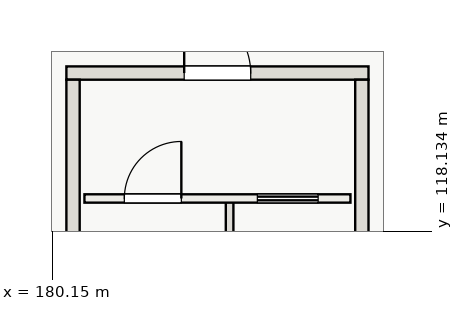
"""IFC4 building model, lengths in metres.
Left out: names, types, materials, properties, quantities, classifications, styles, units other than length and angle.
Written with IfcOpenShell. Run it as: python <this file> out.ifc"""

import sys

from ifc_helpers import new_model, si_unit, direction, frame, frame_2d, origin, place, context, subcontext, project, spatial, rectangle, extrude, element, fill, save


model = new_model("IFC4")
c1 = context("Model", 3, precision=1e-05, world=origin(), true_north=direction((0.0, 1.0)))
c2 = subcontext(c1, "Body", "Model", "MODEL_VIEW")
j1 = project(units=[si_unit("LENGTHUNIT", "METRE"), si_unit("PLANEANGLEUNIT", "RADIAN")], contexts=[c1])
p1 = place(None, origin())
s1 = spatial("IfcSite", under=j1, at=p1, CompositionType="ELEMENT")
p2 = place(p1, origin())
s2 = spatial("IfcBuilding", under=s1, at=p2, CompositionType="ELEMENT")
p3 = place(p2, origin())
s3 = spatial("IfcBuildingStorey", under=s2, at=p3, CompositionType="ELEMENT", Elevation=0.0)
p4 = place(p3, frame((180.525, 122.3, 0.0), z_axis=(0.0, 0.0, 1.0), x_axis=(1.0, 0.0, 0.0)))
e1 = element("IfcWall", 1, at=p4, inside=s3, PredefinedType="SHEAR", context=c2, shape_type="SweptSolid", body=[
    extrude(rectangle(XDim=7.95, YDim=0.35, at=frame_2d((3.975, 0.0))), origin(), (0.0, 0.0, 1.0), 6.0),
])
p5 = place(p4, frame((3.1, 0.0, 0.0)))
e2 = element("IfcOpeningElement", 2, at=p5, cuts=e1, PredefinedType="OPENING", context=c2, shape_type="SweptSolid", body=[
    extrude(rectangle(XDim=1.75, YDim=2.3, at=frame_2d((0.875, 1.15))), frame((0.0, 0.185, 0.0), z_axis=(0.0, -1.0, 0.0), x_axis=(1.0, 0.0, 0.0)), (0.0, 0.0, 1.0), 0.37),
])
for number, where, z_axis, x_axis in (
    (3, (180.7, 110.875, 0.0), (0.0, 0.0, 1.0), (0.0, 1.0, 0.0)),
    (4, (188.3, 110.875, 0.0), (0.0, 0.0, 1.0), (0.0, 1.0, 0.0)),
):
    element("IfcWall", number, at=place(p3, frame(where, z_axis=z_axis, x_axis=x_axis)), inside=s3, PredefinedType="SHEAR", context=c2, shape_type="SweptSolid", body=[
        extrude(rectangle(XDim=11.25, YDim=0.35, at=frame_2d((5.625, 0.0))), origin(), (0.0, 0.0, 1.0), 6.0),
    ])
p6 = place(p3, frame((184.82, 110.95, 0.0), z_axis=(0.0, 0.0, 1.0), x_axis=(0.0, 1.0, 0.0)))
e5 = element("IfcWall", 5, at=p6, inside=s3, PredefinedType="SOLIDWALL", context=c2, shape_type="SweptSolid", body=[
    extrude(rectangle(XDim=8.0, YDim=0.2, at=frame_2d((4.0, 0.0))), origin(), (0.0, 0.0, 1.0), 6.0),
])
p7 = place(p3, frame((181.0, 119.0, 0.0), z_axis=(0.0, 0.0, 1.0), x_axis=(1.0, 0.0, 0.0)))
e6 = element("IfcWall", 6, at=p7, inside=s3, PredefinedType="SOLIDWALL", context=c2, shape_type="SweptSolid", body=[
    extrude(rectangle(XDim=7.0, YDim=0.22, at=frame_2d((3.5, 0.0))), origin(), (0.0, 0.0, 1.0), 5.68),
])
p8 = place(p7, frame((1.05, 0.0, 0.0)))
e7 = element("IfcOpeningElement", 7, at=p8, cuts=e6, PredefinedType="OPENING", context=c2, shape_type="SweptSolid", body=[
    extrude(rectangle(XDim=1.5, YDim=2.2, at=frame_2d((0.75, 1.1))), frame((0.0, 0.12, 0.0), z_axis=(0.0, -1.0, 0.0), x_axis=(1.0, 0.0, 0.0)), (0.0, 0.0, 1.0), 0.24),
])
p9 = place(p7, frame((4.55, 0.0, 0.0)))
e8 = element("IfcOpeningElement", 8, at=p9, cuts=e6, PredefinedType="OPENING", context=c2, shape_type="SweptSolid", body=[
    extrude(rectangle(XDim=1.6, YDim=2.3, at=frame_2d((0.8, 1.15))), frame((0.0, 0.12, 0.0), z_axis=(0.0, -1.0, 0.0), x_axis=(1.0, 0.0, 0.0)), (0.0, 0.0, 1.0), 0.24),
])
p10 = place(p8, origin())
e9 = element("IfcDoor", 9, at=p10, inside=s3, OperationType="SINGLE_SWING_RIGHT", PredefinedType="DOOR", context=c2, shape_type="SweptSolid", body=[
    extrude(rectangle(XDim=1.5, YDim=2.2, at=frame_2d((0.75, 1.1))), frame((0.0, 0.025, 0.0), z_axis=(0.0, -1.0, 0.0), x_axis=(1.0, 0.0, 0.0)), (0.0, 0.0, 1.0), 0.05),
])
fill(e7, e9)
p11 = place(p9, origin())
e10 = element("IfcDoor", 10, at=p11, inside=s3, OperationType="SLIDING_TO_RIGHT", PredefinedType="DOOR", context=c2, shape_type="SweptSolid", body=[
    extrude(rectangle(XDim=1.6, YDim=2.3, at=frame_2d((0.8, 1.15))), frame((0.0, 0.025, 0.0), z_axis=(0.0, -1.0, 0.0), x_axis=(1.0, 0.0, 0.0)), (0.0, 0.0, 1.0), 0.05),
])
fill(e8, e10)
p12 = place(p5, origin())
e11 = element("IfcDoor", 11, at=p12, inside=s3, OperationType="DOUBLE_DOOR_SINGLE_SWING", PredefinedType="DOOR", context=c2, shape_type="SweptSolid", body=[
    extrude(rectangle(XDim=1.75, YDim=2.3, at=frame_2d((0.875, 1.15))), frame((0.0, 0.025, 0.0), z_axis=(0.0, -1.0, 0.0), x_axis=(1.0, 0.0, 0.0)), (0.0, 0.0, 1.0), 0.05),
])
fill(e2, e11)
save(model, sys.argv[1])
